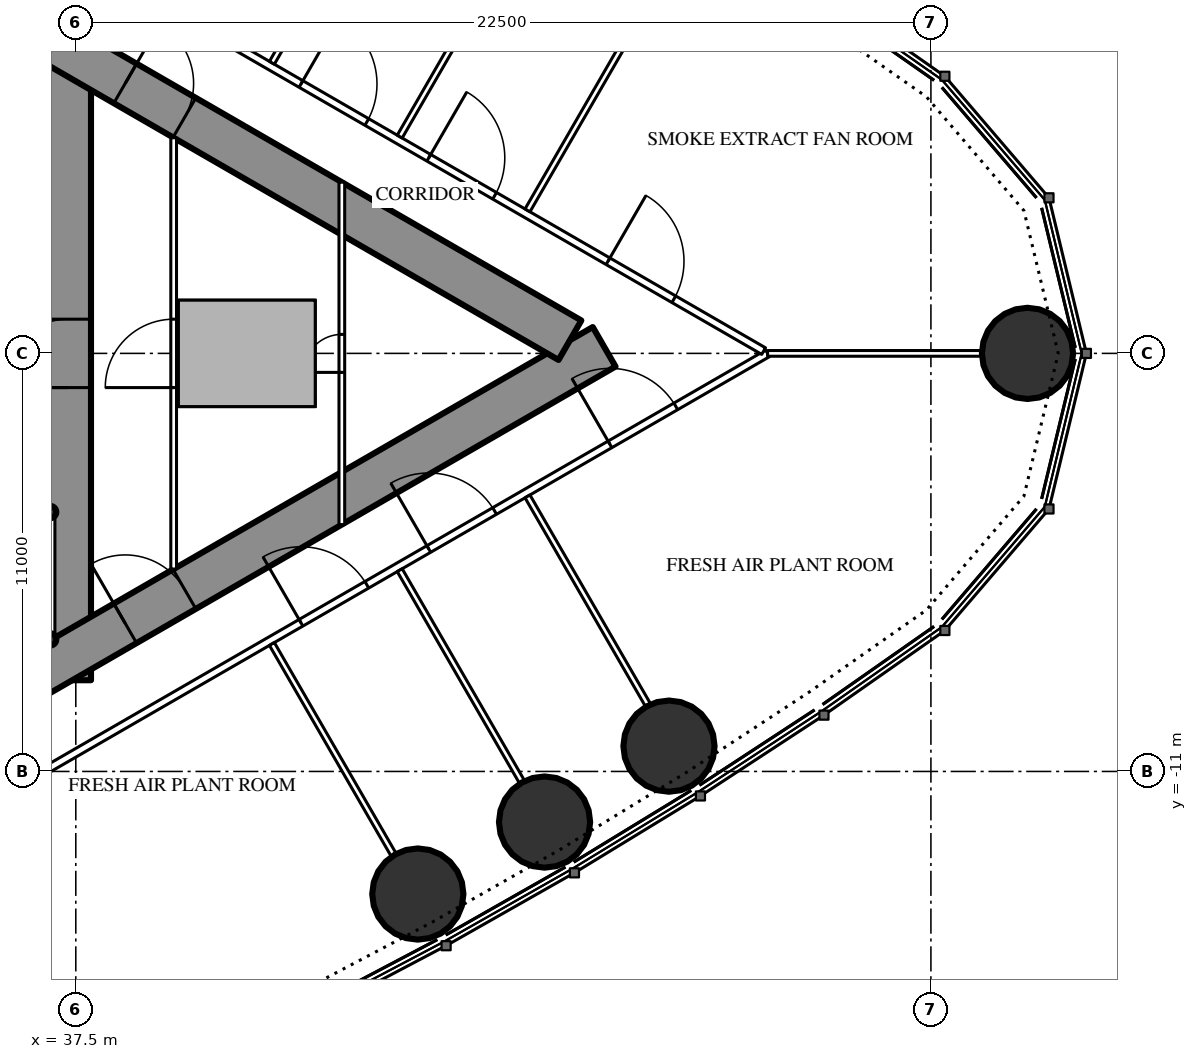
"""IFC4 building model, lengths in metres.
Left out: names, types, materials, properties, quantities, classifications, styles, units other than length and angle.
Written with IfcOpenShell. Run it as: python <this file> out.ifc"""

import sys

from ifc_helpers import new_model, si_unit, direction, frame, frame_2d, origin, origin_2d, place, context, subcontext, project, spatial, rectangle, circle, hollow_circle, extrude, element, fill, save


model = new_model("IFC4")
c1 = context("Model", 3, precision=1e-05, world=origin(), true_north=direction((0.0, 1.0)))
c2 = subcontext(c1, "Body", "Model", "MODEL_VIEW")
j1 = project(units=[si_unit("LENGTHUNIT", "METRE"), si_unit("PLANEANGLEUNIT", "RADIAN")], contexts=[c1])
p1 = place(None, origin())
s1 = spatial("IfcSite", under=j1, at=p1, CompositionType="ELEMENT")
p2 = place(p1, origin())
s2 = spatial("IfcBuilding", under=s1, at=p2, CompositionType="ELEMENT")
p3 = place(p2, frame((0.0, 0.0, 268.3)))
s3 = spatial("IfcBuildingStorey", under=s2, at=p3, CompositionType="ELEMENT", Elevation=268.3)
for number, where, z_axis, x_axis in (
    (1, (62.542, 0.0, 0.0), (0.0, 0.0, 1.0), (1.0, 0.0, 0.0)),
    (2, (46.499, -14.226, 0.0), (0.0, 0.0, 1.0), (1.0, 0.0, 0.0)),
    (3, (49.834, -12.332, 0.0), (0.0, 0.0, 1.0), (1.0, 0.0, 0.0)),
    (4, (53.108, -10.334, 0.0), (0.0, 0.0, 1.0), (1.0, 0.0, 0.0)),
):
    element("IfcColumn", number, at=place(p3, frame(where, z_axis=z_axis, x_axis=x_axis)), inside=s3, PredefinedType="COLUMN", context=c2, shape_type="SweptSolid", body=[
        extrude(circle(Radius=1.2, at=origin_2d()), origin(), (0.0, 0.0, 1.0), 5.0),
    ])
p4 = place(p3, frame((37.3, -8.6, 0.0), z_axis=(0.0, 0.0, 1.0), x_axis=(0.0, 1.0, 0.0)))
e5 = element("IfcWall", 5, at=p4, inside=s3, PredefinedType="SHEAR", context=c2, shape_type="SweptSolid", body=[
    extrude(rectangle(XDim=17.2, YDim=1.2, at=frame_2d((8.6, 0.0))), origin(), (0.0, 0.0, 1.0), 5.0),
])
p5 = place(p4, frame((7.7, 0.0, 0.0)))
e6 = element("IfcOpeningElement", 6, at=p5, cuts=e5, PredefinedType="OPENING", context=c2, shape_type="SweptSolid", body=[
    extrude(rectangle(XDim=1.8, YDim=2.2, at=frame_2d((0.9, 1.1))), frame((0.0, 0.61, 0.0), z_axis=(0.0, -1.0, 0.0), x_axis=(1.0, 0.0, 0.0)), (0.0, 0.0, 1.0), 1.22),
])
p6 = place(p3, frame((27.2, -13.8, 0.0), z_axis=(0.0, 0.0, 1.0), x_axis=(0.866027159892, 0.499996958321, 0.0)))
e7 = element("IfcWall", 7, at=p6, inside=s3, PredefinedType="SHEAR", context=c2, shape_type="SweptSolid", body=[
    extrude(rectangle(XDim=27.947, YDim=1.2, at=frame_2d((13.973, 0.0))), origin(), (0.0, 0.0, 1.0), 5.0),
])
p7 = place(p6, frame((4.6, 0.0, 0.0)))
e8 = element("IfcOpeningElement", 8, at=p7, cuts=e7, PredefinedType="OPENING", context=c2, shape_type="SweptSolid", body=[
    extrude(rectangle(XDim=1.0, YDim=2.2, at=frame_2d((0.5, 1.1))), frame((0.0, 0.61, 0.0), z_axis=(0.0, -1.0, 0.0), x_axis=(1.0, 0.0, 0.0)), (0.0, 0.0, 1.0), 1.22),
])
p8 = place(p6, frame((13.395, 0.0, 0.0)))
e9 = element("IfcOpeningElement", 9, at=p8, cuts=e7, PredefinedType="OPENING", context=c2, shape_type="SweptSolid", body=[
    extrude(rectangle(XDim=1.8, YDim=2.2, at=frame_2d((0.9, 1.1))), frame((0.0, 0.61, 0.0), z_axis=(0.0, -1.0, 0.0), x_axis=(1.0, 0.0, 0.0)), (0.0, 0.0, 1.0), 1.22),
])
p9 = place(p3, frame((27.2, 13.8, 0.0), z_axis=(0.0, 0.0, 1.0), x_axis=(0.866024515034, -0.500001539357, 0.0)))
e10 = element("IfcWall", 10, at=p9, inside=s3, PredefinedType="SHEAR", context=c2, shape_type="SweptSolid", body=[
    extrude(rectangle(XDim=26.907, YDim=1.2, at=frame_2d((13.454, 0.0))), origin(), (0.0, 0.0, 1.0), 5.0),
])
p10 = place(p9, frame((4.6, 0.0, 0.0)))
e11 = element("IfcOpeningElement", 11, at=p10, cuts=e10, PredefinedType="OPENING", context=c2, shape_type="SweptSolid", body=[
    extrude(rectangle(XDim=1.0, YDim=2.2, at=frame_2d((0.5, 1.1))), frame((0.0, 0.61, 0.0), z_axis=(0.0, -1.0, 0.0), x_axis=(1.0, 0.0, 0.0)), (0.0, 0.0, 1.0), 1.22),
])
p11 = place(p9, frame((13.395, 0.0, 0.0)))
e12 = element("IfcOpeningElement", 12, at=p11, cuts=e10, PredefinedType="OPENING", context=c2, shape_type="SweptSolid", body=[
    extrude(rectangle(XDim=1.8, YDim=2.2, at=frame_2d((0.9, 1.1))), frame((0.0, 0.61, 0.0), z_axis=(0.0, -1.0, 0.0), x_axis=(1.0, 0.0, 0.0)), (0.0, 0.0, 1.0), 1.22),
])
for number, where, z_axis, x_axis in (
    (13, (36.825, -7.525, 5.0), (0.0, 0.0, 1.0), (1.0, 0.0, 0.0)),
    (14, (36.825, -4.175, 5.0), (0.0, 0.0, 1.0), (1.0, 0.0, 0.0)),
):
    element("IfcColumn", number, at=place(p3, frame(where, z_axis=z_axis, x_axis=x_axis)), inside=s3, PredefinedType="COLUMN", context=c2, shape_type="SweptSolid", body=[
        extrude(hollow_circle(Radius=0.162, WallThickness=0.012, at=origin_2d()), origin(), (0.0, 0.0, 1.0), 3.0),
    ])
p12 = place(p3, frame((36.825, -7.422, 5.0), z_axis=(0.0, 0.0, 1.0), x_axis=(0.0, 1.0, 0.0)))
e15 = element("IfcWall", 15, at=p12, inside=s3, PredefinedType="SOLIDWALL", context=c2, shape_type="SweptSolid", body=[
    extrude(rectangle(XDim=3.144, YDim=0.25, at=frame_2d((1.572, 0.0))), origin(), (0.0, 0.0, 1.0), 2.54),
])
for number, where, z_axis, x_axis in (
    (16, (40.2, -1.3, 5.0), (0.0, 0.0, 1.0), (1.0, 0.0, 0.0)),
    (17, (43.8, 1.3, 5.0), (0.0, 0.0, 1.0), (-1.0, 0.0, 0.0)),
):
    element("IfcWall", number, at=place(p3, frame(where, z_axis=z_axis, x_axis=x_axis)), inside=s3, PredefinedType="SOLIDWALL", context=c2, shape_type="SweptSolid", body=[
        extrude(rectangle(XDim=3.6, YDim=0.2, at=frame_2d((1.8, 0.0))), origin(), (0.0, 0.0, 1.0), 2.6),
    ])
p13 = place(p3, frame((40.3, 1.2, 5.0), z_axis=(0.0, 0.0, 1.0), x_axis=(0.0, -1.0, 0.0)))
e18 = element("IfcWall", 18, at=p13, inside=s3, PredefinedType="SOLIDWALL", context=c2, shape_type="SweptSolid", body=[
    extrude(rectangle(XDim=2.4, YDim=0.2, at=frame_2d((1.2, 0.0))), origin(), (0.0, 0.0, 1.0), 2.6),
])
p14 = place(p13, frame((0.7, 0.0, 0.0)))
e19 = element("IfcOpeningElement", 19, at=p14, cuts=e18, PredefinedType="OPENING", context=c2, shape_type="SweptSolid", body=[
    extrude(rectangle(XDim=1.0, YDim=2.2, at=frame_2d((0.5, 1.1))), frame((0.0, 0.11, 0.0), z_axis=(0.0, -1.0, 0.0), x_axis=(1.0, 0.0, 0.0)), (0.0, 0.0, 1.0), 0.22),
])
p15 = place(p3, frame((43.7, -1.2, 5.0), z_axis=(0.0, 0.0, 1.0), x_axis=(0.0, 1.0, 0.0)))
e20 = element("IfcWall", 20, at=p15, inside=s3, PredefinedType="SOLIDWALL", context=c2, shape_type="SweptSolid", body=[
    extrude(rectangle(XDim=2.4, YDim=0.2, at=frame_2d((1.2, 0.0))), origin(), (0.0, 0.0, 1.0), 2.6),
])
p16 = place(p3, frame((28.959, -15.44, 0.0), z_axis=(0.0, 0.0, 1.0), x_axis=(0.866025227435, 0.500000305447, 0.0)))
e21 = element("IfcWall", 21, at=p16, inside=s3, PredefinedType="PARTITIONING", context=c2, shape_type="SweptSolid", body=[
    extrude(rectangle(XDim=30.88, YDim=0.2, at=frame_2d((15.44, 0.0))), origin(), (0.0, 0.0, 1.0), 4.7),
])
p17 = place(p16, frame((6.994, 0.0, 0.0)))
e22 = element("IfcOpeningElement", 22, at=p17, cuts=e21, PredefinedType="OPENING", context=c2, shape_type="SweptSolid", body=[
    extrude(rectangle(XDim=2.0, YDim=2.4, at=frame_2d((1.0, 1.2))), frame((0.0, 0.11, 0.0), z_axis=(0.0, -1.0, 0.0), x_axis=(1.0, 0.0, 0.0)), (0.0, 0.0, 1.0), 0.22),
])
p18 = place(p16, frame((16.704, 0.0, 0.0)))
e23 = element("IfcOpeningElement", 23, at=p18, cuts=e21, PredefinedType="OPENING", context=c2, shape_type="SweptSolid", body=[
    extrude(rectangle(XDim=2.0, YDim=2.4, at=frame_2d((1.0, 1.2))), frame((0.0, 0.11, 0.0), z_axis=(0.0, -1.0, 0.0), x_axis=(1.0, 0.0, 0.0)), (0.0, 0.0, 1.0), 0.22),
])
p19 = place(p16, frame((20.587, 0.0, 0.0)))
e24 = element("IfcOpeningElement", 24, at=p19, cuts=e21, PredefinedType="OPENING", context=c2, shape_type="SweptSolid", body=[
    extrude(rectangle(XDim=2.0, YDim=2.4, at=frame_2d((1.0, 1.2))), frame((0.0, 0.11, 0.0), z_axis=(0.0, -1.0, 0.0), x_axis=(1.0, 0.0, 0.0)), (0.0, 0.0, 1.0), 0.22),
])
p20 = place(p16, frame((26.092, 0.0, 0.0)))
e25 = element("IfcOpeningElement", 25, at=p20, cuts=e21, PredefinedType="OPENING", context=c2, shape_type="SweptSolid", body=[
    extrude(rectangle(XDim=2.0, YDim=2.4, at=frame_2d((1.0, 1.2))), frame((0.0, 0.11, 0.0), z_axis=(0.0, -1.0, 0.0), x_axis=(1.0, 0.0, 0.0)), (0.0, 0.0, 1.0), 0.22),
])
p21 = place(p3, frame((28.959, 15.44, 0.0), z_axis=(0.0, 0.0, 1.0), x_axis=(0.866027378611, -0.499996579484, 0.0)))
e26 = element("IfcWall", 26, at=p21, inside=s3, PredefinedType="PARTITIONING", context=c2, shape_type="SweptSolid", body=[
    extrude(rectangle(XDim=30.76, YDim=0.2, at=frame_2d((15.38, 0.0))), origin(), (0.0, 0.0, 1.0), 4.7),
])
p22 = place(p21, frame((26.032, 0.0, 0.0)))
e27 = element("IfcOpeningElement", 27, at=p22, cuts=e26, PredefinedType="OPENING", context=c2, shape_type="SweptSolid", body=[
    extrude(rectangle(XDim=2.0, YDim=2.4, at=frame_2d((1.0, 1.2))), frame((0.0, 0.11, 0.0), z_axis=(0.0, -1.0, 0.0), x_axis=(1.0, 0.0, 0.0)), (0.0, 0.0, 1.0), 0.22),
])
p23 = place(p21, frame((20.587, 0.0, 0.0)))
e28 = element("IfcOpeningElement", 28, at=p23, cuts=e26, PredefinedType="OPENING", context=c2, shape_type="SweptSolid", body=[
    extrude(rectangle(XDim=2.0, YDim=2.4, at=frame_2d((1.0, 1.2))), frame((0.0, 0.11, 0.0), z_axis=(0.0, -1.0, 0.0), x_axis=(1.0, 0.0, 0.0)), (0.0, 0.0, 1.0), 0.22),
])
p24 = place(p21, frame((16.704, 0.0, 0.0)))
e29 = element("IfcOpeningElement", 29, at=p24, cuts=e26, PredefinedType="OPENING", context=c2, shape_type="SweptSolid", body=[
    extrude(rectangle(XDim=2.0, YDim=2.4, at=frame_2d((1.0, 1.2))), frame((0.0, 0.11, 0.0), z_axis=(0.0, -1.0, 0.0), x_axis=(1.0, 0.0, 0.0)), (0.0, 0.0, 1.0), 0.22),
])
p25 = place(p21, frame((6.994, 0.0, 0.0)))
e30 = element("IfcOpeningElement", 30, at=p25, cuts=e26, PredefinedType="OPENING", context=c2, shape_type="SweptSolid", body=[
    extrude(rectangle(XDim=2.0, YDim=2.4, at=frame_2d((1.0, 1.2))), frame((0.0, 0.11, 0.0), z_axis=(0.0, -1.0, 0.0), x_axis=(1.0, 0.0, 0.0)), (0.0, 0.0, 1.0), 0.22),
])
p26 = place(p3, frame((42.66, -7.646, 0.0), z_axis=(0.0, 0.0, 1.0), x_axis=(0.499996592859, -0.866027370889, 0.0)))
e31 = element("IfcWall", 31, at=p26, inside=s3, PredefinedType="PARTITIONING", context=c2, shape_type="SweptSolid", body=[
    extrude(rectangle(XDim=6.398, YDim=0.15, at=frame_2d((3.199, 0.0))), origin(), (0.0, 0.0, 1.0), 3.8),
])
p27 = place(p3, frame((46.023, -5.704, 0.0), z_axis=(0.0, 0.0, 1.0), x_axis=(0.499984478165, -0.866034365135, 0.0)))
e32 = element("IfcWall", 32, at=p27, inside=s3, PredefinedType="PARTITIONING", context=c2, shape_type="SweptSolid", body=[
    extrude(rectangle(XDim=6.426, YDim=0.15, at=frame_2d((3.213, 0.0))), origin(), (0.0, 0.0, 1.0), 3.8),
])
p28 = place(p3, frame((49.385, -3.763, 0.0), z_axis=(0.0, 0.0, 1.0), x_axis=(0.499999447814, -0.866025722589, 0.0)))
e33 = element("IfcWall", 33, at=p28, inside=s3, PredefinedType="PARTITIONING", context=c2, shape_type="SweptSolid", body=[
    extrude(rectangle(XDim=6.333, YDim=0.15, at=frame_2d((3.166, 0.0))), origin(), (0.0, 0.0, 1.0), 3.8),
])
p29 = place(p3, frame((42.66, 7.646, 0.0), z_axis=(0.0, 0.0, 1.0), x_axis=(0.499996592859, 0.866027370889, 0.0)))
e34 = element("IfcWall", 34, at=p29, inside=s3, PredefinedType="PARTITIONING", context=c2, shape_type="SweptSolid", body=[
    extrude(rectangle(XDim=6.398, YDim=0.15, at=frame_2d((3.199, 0.0))), origin(), (0.0, 0.0, 1.0), 3.8),
])
p30 = place(p3, frame((46.023, 5.704, 0.0), z_axis=(0.0, 0.0, 1.0), x_axis=(0.499984478165, 0.866034365135, 0.0)))
e35 = element("IfcWall", 35, at=p30, inside=s3, PredefinedType="PARTITIONING", context=c2, shape_type="SweptSolid", body=[
    extrude(rectangle(XDim=6.426, YDim=0.15, at=frame_2d((3.213, 0.0))), origin(), (0.0, 0.0, 1.0), 3.8),
])
p31 = place(p3, frame((49.385, 3.763, 0.0), z_axis=(0.0, 0.0, 1.0), x_axis=(0.499999447814, 0.866025722589, 0.0)))
e36 = element("IfcWall", 36, at=p31, inside=s3, PredefinedType="PARTITIONING", context=c2, shape_type="SweptSolid", body=[
    extrude(rectangle(XDim=6.333, YDim=0.15, at=frame_2d((3.166, 0.0))), origin(), (0.0, 0.0, 1.0), 3.8),
])
p32 = place(p3, frame((55.702, 0.0, 0.0), z_axis=(0.0, 0.0, 1.0), x_axis=(1.0, 0.0, 0.0)))
e37 = element("IfcWall", 37, at=p32, inside=s3, PredefinedType="PARTITIONING", context=c2, shape_type="SweptSolid", body=[
    extrude(rectangle(XDim=5.619, YDim=0.15, at=frame_2d((2.81, 0.0))), origin(), (0.0, 0.0, 1.0), 3.8),
])
p33 = place(p3, frame((40.075, -5.674, 0.0), z_axis=(0.0, 0.0, 1.0), x_axis=(0.0, 1.0, 0.0)))
e38 = element("IfcWall", 38, at=p33, inside=s3, PredefinedType="PARTITIONING", context=c2, shape_type="SweptSolid", body=[
    extrude(rectangle(XDim=11.348, YDim=0.15, at=frame_2d((5.674, 0.0))), origin(), (0.0, 0.0, 1.0), 4.7),
])
p34 = place(p33, frame((4.774, 0.0, 0.0)))
e39 = element("IfcOpeningElement", 39, at=p34, cuts=e38, PredefinedType="OPENING", context=c2, shape_type="SweptSolid", body=[
    extrude(rectangle(XDim=1.8, YDim=2.2, at=frame_2d((0.9, 1.1))), frame((0.0, 0.085, 0.0), z_axis=(0.0, -1.0, 0.0), x_axis=(1.0, 0.0, 0.0)), (0.0, 0.0, 1.0), 0.17),
])
p35 = place(p3, frame((44.5, -4.505, 0.0), z_axis=(0.0, 0.0, 1.0), x_axis=(0.0, 1.0, 0.0)))
e40 = element("IfcWall", 40, at=p35, inside=s3, PredefinedType="PARTITIONING", context=c2, shape_type="SweptSolid", body=[
    extrude(rectangle(XDim=9.009, YDim=0.15, at=frame_2d((4.505, 0.0))), origin(), (0.0, 0.0, 1.0), 4.7),
])
p36 = place(p35, frame((4.005, 0.0, 0.0)))
e41 = element("IfcOpeningElement", 41, at=p36, cuts=e40, PredefinedType="OPENING", context=c2, shape_type="SweptSolid", body=[
    extrude(rectangle(XDim=1.0, YDim=2.2, at=frame_2d((0.5, 1.1))), frame((0.0, 0.085, 0.0), z_axis=(0.0, -1.0, 0.0), x_axis=(1.0, 0.0, 0.0)), (0.0, 0.0, 1.0), 0.17),
])
p37 = place(p14, origin())
e42 = element("IfcDoor", 42, at=p37, inside=s3, OperationType="SINGLE_SWING_LEFT", PredefinedType="DOOR", context=c2, shape_type="SweptSolid", body=[
    extrude(rectangle(XDim=1.0, YDim=2.2, at=frame_2d((0.5, 1.1))), frame((0.0, 0.025, 0.0), z_axis=(0.0, -1.0, 0.0), x_axis=(1.0, 0.0, 0.0)), (0.0, 0.0, 1.0), 0.05),
])
fill(e19, e42)
p38 = place(p18, origin())
e43 = element("IfcDoor", 43, at=p38, inside=s3, OperationType="DOUBLE_DOOR_SINGLE_SWING", PredefinedType="DOOR", context=c2, shape_type="SweptSolid", body=[
    extrude(rectangle(XDim=2.0, YDim=2.4, at=frame_2d((1.0, 1.2))), frame((0.0, 0.025, 0.0), z_axis=(0.0, -1.0, 0.0), x_axis=(1.0, 0.0, 0.0)), (0.0, 0.0, 1.0), 0.05),
])
fill(e23, e43)
p39 = place(p19, origin())
e44 = element("IfcDoor", 44, at=p39, inside=s3, OperationType="DOUBLE_DOOR_SINGLE_SWING", PredefinedType="DOOR", context=c2, shape_type="SweptSolid", body=[
    extrude(rectangle(XDim=2.0, YDim=2.4, at=frame_2d((1.0, 1.2))), frame((0.0, 0.025, 0.0), z_axis=(0.0, -1.0, 0.0), x_axis=(1.0, 0.0, 0.0)), (0.0, 0.0, 1.0), 0.05),
])
fill(e24, e44)
p40 = place(p20, origin())
e45 = element("IfcDoor", 45, at=p40, inside=s3, OperationType="DOUBLE_DOOR_SINGLE_SWING", PredefinedType="DOOR", context=c2, shape_type="SweptSolid", body=[
    extrude(rectangle(XDim=2.0, YDim=2.4, at=frame_2d((1.0, 1.2))), frame((0.0, 0.025, 0.0), z_axis=(0.0, -1.0, 0.0), x_axis=(1.0, 0.0, 0.0)), (0.0, 0.0, 1.0), 0.05),
])
fill(e25, e45)
p41 = place(p22, origin())
e46 = element("IfcDoor", 46, at=p41, inside=s3, OperationType="DOUBLE_DOOR_SINGLE_SWING", PredefinedType="DOOR", context=c2, shape_type="SweptSolid", body=[
    extrude(rectangle(XDim=2.0, YDim=2.4, at=frame_2d((1.0, 1.2))), frame((0.0, 0.025, 0.0), z_axis=(0.0, -1.0, 0.0), x_axis=(1.0, 0.0, 0.0)), (0.0, 0.0, 1.0), 0.05),
])
fill(e27, e46)
p42 = place(p23, origin())
e47 = element("IfcDoor", 47, at=p42, inside=s3, OperationType="DOUBLE_DOOR_SINGLE_SWING", PredefinedType="DOOR", context=c2, shape_type="SweptSolid", body=[
    extrude(rectangle(XDim=2.0, YDim=2.4, at=frame_2d((1.0, 1.2))), frame((0.0, 0.025, 0.0), z_axis=(0.0, -1.0, 0.0), x_axis=(1.0, 0.0, 0.0)), (0.0, 0.0, 1.0), 0.05),
])
fill(e28, e47)
p43 = place(p24, origin())
e48 = element("IfcDoor", 48, at=p43, inside=s3, OperationType="DOUBLE_DOOR_SINGLE_SWING", PredefinedType="DOOR", context=c2, shape_type="SweptSolid", body=[
    extrude(rectangle(XDim=2.0, YDim=2.4, at=frame_2d((1.0, 1.2))), frame((0.0, 0.025, 0.0), z_axis=(0.0, -1.0, 0.0), x_axis=(1.0, 0.0, 0.0)), (0.0, 0.0, 1.0), 0.05),
])
fill(e29, e48)
p44 = place(p34, origin())
e49 = element("IfcDoor", 49, at=p44, inside=s3, OperationType="DOUBLE_DOOR_SINGLE_SWING", PredefinedType="DOOR", context=c2, shape_type="SweptSolid", body=[
    extrude(rectangle(XDim=1.8, YDim=2.2, at=frame_2d((0.9, 1.1))), frame((0.0, 0.025, 0.0), z_axis=(0.0, -1.0, 0.0), x_axis=(1.0, 0.0, 0.0)), (0.0, 0.0, 1.0), 0.05),
])
fill(e39, e49)
p45 = place(p36, origin())
e50 = element("IfcDoor", 50, at=p45, inside=s3, OperationType="SINGLE_SWING_LEFT", PredefinedType="DOOR", context=c2, shape_type="SweptSolid", body=[
    extrude(rectangle(XDim=1.0, YDim=2.2, at=frame_2d((0.5, 1.1))), frame((0.0, 0.025, 0.0), z_axis=(0.0, -1.0, 0.0), x_axis=(1.0, 0.0, 0.0)), (0.0, 0.0, 1.0), 0.05),
])
fill(e41, e50)
p46 = place(p8, origin())
e51 = element("IfcDoor", 51, at=p46, inside=s3, OperationType="DOUBLE_DOOR_SINGLE_SWING", PredefinedType="DOOR", context=c2, shape_type="SweptSolid", body=[
    extrude(rectangle(XDim=1.8, YDim=2.2, at=frame_2d((0.9, 1.1))), frame((0.0, 0.025, 0.0), z_axis=(0.0, -1.0, 0.0), x_axis=(1.0, 0.0, 0.0)), (0.0, 0.0, 1.0), 0.05),
])
fill(e9, e51)
p47 = place(p11, origin())
e52 = element("IfcDoor", 52, at=p47, inside=s3, OperationType="DOUBLE_DOOR_SINGLE_SWING", PredefinedType="DOOR", context=c2, shape_type="SweptSolid", body=[
    extrude(rectangle(XDim=1.8, YDim=2.2, at=frame_2d((0.9, 1.1))), frame((0.0, 0.025, 0.0), z_axis=(0.0, -1.0, 0.0), x_axis=(1.0, 0.0, 0.0)), (0.0, 0.0, 1.0), 0.05),
])
fill(e12, e52)
p48 = place(p5, origin())
e53 = element("IfcDoor", 53, at=p48, inside=s3, OperationType="DOUBLE_DOOR_SINGLE_SWING", PredefinedType="DOOR", context=c2, shape_type="SweptSolid", body=[
    extrude(rectangle(XDim=1.8, YDim=2.2, at=frame_2d((0.9, 1.1))), frame((0.0, 0.025, 0.0), z_axis=(0.0, -1.0, 0.0), x_axis=(1.0, 0.0, 0.0)), (0.0, 0.0, 1.0), 0.05),
])
fill(e6, e53)
save(model, sys.argv[1])
